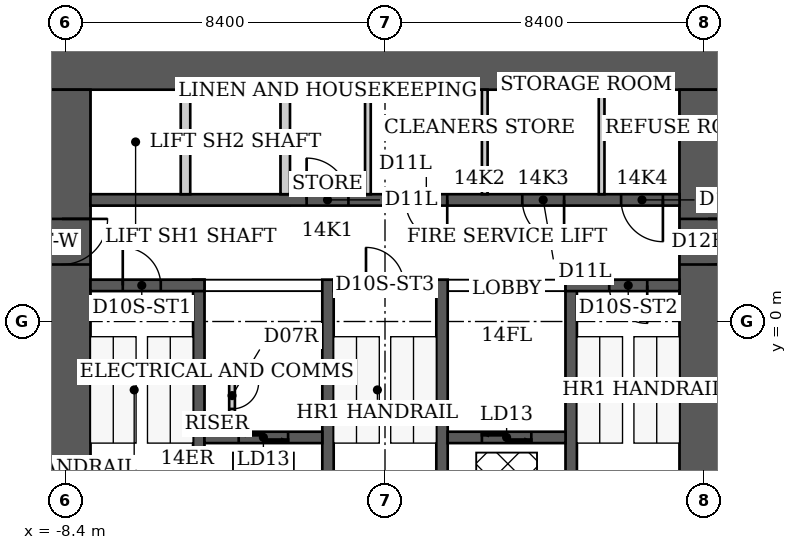
"""IFC4 building model, lengths in metres.
Left out: names, types, materials, properties, quantities, classifications, styles, units other than length and angle.
Written with IfcOpenShell. Run it as: python <this file> out.ifc"""

import sys

from ifc_helpers import new_model, si_unit, direction, frame, frame_2d, origin, place, context, subcontext, project, spatial, rectangle, extrude, element, fill, save


model = new_model("IFC4")
c1 = context("Model", 3, precision=1e-05, world=origin(), true_north=direction((0.0, 1.0)))
c2 = subcontext(c1, "Body", "Model", "MODEL_VIEW")
j1 = project(units=[si_unit("LENGTHUNIT", "METRE"), si_unit("PLANEANGLEUNIT", "RADIAN")], contexts=[c1])
p1 = place(None, origin())
s1 = spatial("IfcSite", under=j1, at=p1, CompositionType="ELEMENT")
p2 = place(p1, origin())
s2 = spatial("IfcBuilding", under=s1, at=p2, CompositionType="ELEMENT")
p3 = place(p2, frame((0.0, 0.0, 61.0)))
s3 = spatial("IfcBuildingStorey", under=s2, at=p3, CompositionType="ELEMENT", Elevation=61.0)
p4 = place(p3, frame((-9.25, 6.85, 0.0), z_axis=(0.0, 0.0, 1.0), x_axis=(1.0, 0.0, 0.0)))
e1 = element("IfcWall", 1, at=p4, inside=s3, PredefinedType="SHEAR", context=c2, shape_type="SweptSolid", body=[
    extrude(rectangle(XDim=18.5, YDim=1.5, at=frame_2d((9.25, 0.0))), origin(), (0.0, 0.0, 1.0), 3.8),
])
p5 = place(p3, frame((-8.5, -9.2, 0.0), z_axis=(0.0, 0.0, 1.0), x_axis=(0.0, 1.0, 0.0)))
e2 = element("IfcWall", 2, at=p5, inside=s3, PredefinedType="SHEAR", context=c2, shape_type="SweptSolid", body=[
    extrude(rectangle(XDim=15.3, YDim=1.5, at=frame_2d((7.65, 0.0))), origin(), (0.0, 0.0, 1.0), 3.8),
])
p6 = place(p5, frame((10.7, 0.0, 0.0)))
e3 = element("IfcOpeningElement", 3, at=p6, cuts=e2, PredefinedType="OPENING", context=c2, shape_type="SweptSolid", body=[
    extrude(rectangle(XDim=1.2, YDim=2.2, at=frame_2d((0.6, 1.1))), frame((0.0, 0.75, 0.0), z_axis=(0.0, -1.0, 0.0), x_axis=(1.0, 0.0, 0.0)), (0.0, 0.0, 1.0), 1.5),
])
p7 = place(p3, frame((8.5, -9.2, 0.0), z_axis=(0.0, 0.0, 1.0), x_axis=(0.0, 1.0, 0.0)))
e4 = element("IfcWall", 4, at=p7, inside=s3, PredefinedType="SHEAR", context=c2, shape_type="SweptSolid", body=[
    extrude(rectangle(XDim=15.3, YDim=1.5, at=frame_2d((7.65, 0.0))), origin(), (0.0, 0.0, 1.0), 3.8),
])
p8 = place(p7, frame((10.7, 0.0, 0.0)))
e5 = element("IfcOpeningElement", 5, at=p8, cuts=e4, PredefinedType="OPENING", context=c2, shape_type="SweptSolid", body=[
    extrude(rectangle(XDim=1.2, YDim=2.2, at=frame_2d((0.6, 1.1))), frame((0.0, 0.75, 0.0), z_axis=(0.0, -1.0, 0.0), x_axis=(1.0, 0.0, 0.0)), (0.0, 0.0, 1.0), 1.5),
])
for number, where, z_axis, x_axis in (
    (6, (-4.9, -6.1, 0.0), (0.0, 0.0, 1.0), (0.0, 1.0, 0.0)),
    (7, (-1.5, -6.1, 0.0), (0.0, 0.0, 1.0), (0.0, 1.0, 0.0)),
    (8, (1.5, -6.1, 0.0), (0.0, 0.0, 1.0), (0.0, 1.0, 0.0)),
    (9, (4.9, -6.1, 0.0), (0.0, 0.0, 1.0), (0.0, 1.0, 0.0)),
):
    element("IfcWall", number, at=place(p3, frame(where, z_axis=z_axis, x_axis=x_axis)), inside=s3, PredefinedType="SHEAR", context=c2, shape_type="SweptSolid", body=[
        extrude(rectangle(XDim=7.2, YDim=0.3, at=frame_2d((3.6, 0.0))), origin(), (0.0, 0.0, 1.0), 3.8),
    ])
p9 = place(p3, frame((-7.75, 0.95, 0.0), z_axis=(0.0, 0.0, 1.0), x_axis=(1.0, 0.0, 0.0)))
e10 = element("IfcWall", 10, at=p9, inside=s3, PredefinedType="SHEAR", context=c2, shape_type="SweptSolid", body=[
    extrude(rectangle(XDim=3.0, YDim=0.3, at=frame_2d((1.5, 0.0))), origin(), (0.0, 0.0, 1.0), 3.8),
])
p10 = place(p9, frame((0.85, 0.0, 0.0)))
e11 = element("IfcOpeningElement", 11, at=p10, cuts=e10, PredefinedType="OPENING", context=c2, shape_type="SweptSolid", body=[
    extrude(rectangle(XDim=1.0, YDim=2.2, at=frame_2d((0.5, 1.1))), frame((0.0, 0.15, 0.0), z_axis=(0.0, -1.0, 0.0), x_axis=(1.0, 0.0, 0.0)), (0.0, 0.0, 1.0), 0.3),
])
p11 = place(p3, frame((-1.35, 0.95, 0.0), z_axis=(0.0, 0.0, 1.0), x_axis=(1.0, 0.0, 0.0)))
e12 = element("IfcWall", 12, at=p11, inside=s3, PredefinedType="SHEAR", context=c2, shape_type="SweptSolid", body=[
    extrude(rectangle(XDim=2.7, YDim=0.3, at=frame_2d((1.35, 0.0))), origin(), (0.0, 0.0, 1.0), 3.8),
])
p12 = place(p11, frame((0.85, 0.0, 0.0)))
e13 = element("IfcOpeningElement", 13, at=p12, cuts=e12, PredefinedType="OPENING", context=c2, shape_type="SweptSolid", body=[
    extrude(rectangle(XDim=1.0, YDim=2.2, at=frame_2d((0.5, 1.1))), frame((0.0, 0.15, 0.0), z_axis=(0.0, -1.0, 0.0), x_axis=(1.0, 0.0, 0.0)), (0.0, 0.0, 1.0), 0.3),
])
p13 = place(p3, frame((4.75, 0.95, 0.0), z_axis=(0.0, 0.0, 1.0), x_axis=(1.0, 0.0, 0.0)))
e14 = element("IfcWall", 14, at=p13, inside=s3, PredefinedType="SHEAR", context=c2, shape_type="SweptSolid", body=[
    extrude(rectangle(XDim=3.0, YDim=0.3, at=frame_2d((1.5, 0.0))), origin(), (0.0, 0.0, 1.0), 3.8),
])
p14 = place(p13, frame((1.15, 0.0, 0.0)))
e15 = element("IfcOpeningElement", 15, at=p14, cuts=e14, PredefinedType="OPENING", context=c2, shape_type="SweptSolid", body=[
    extrude(rectangle(XDim=1.0, YDim=2.2, at=frame_2d((0.5, 1.1))), frame((0.0, 0.15, 0.0), z_axis=(0.0, -1.0, 0.0), x_axis=(1.0, 0.0, 0.0)), (0.0, 0.0, 1.0), 0.3),
])
p15 = place(p3, frame((-4.75, -3.05, 0.0), z_axis=(0.0, 0.0, 1.0), x_axis=(1.0, 0.0, 0.0)))
e16 = element("IfcWall", 16, at=p15, inside=s3, PredefinedType="SHEAR", context=c2, shape_type="SweptSolid", body=[
    extrude(rectangle(XDim=3.1, YDim=0.3, at=frame_2d((1.55, 0.0))), origin(), (0.0, 0.0, 1.0), 3.8),
])
p16 = place(p15, frame((0.9, 0.0, 0.0)))
e17 = element("IfcOpeningElement", 17, at=p16, cuts=e16, PredefinedType="OPENING", context=c2, shape_type="SweptSolid", body=[
    extrude(rectangle(XDim=1.3, YDim=2.1, at=frame_2d((0.65, 1.05))), frame((0.0, 0.15, 0.0), z_axis=(0.0, -1.0, 0.0), x_axis=(1.0, 0.0, 0.0)), (0.0, 0.0, 1.0), 0.3),
])
p17 = place(p3, frame((1.65, -3.05, 0.0), z_axis=(0.0, 0.0, 1.0), x_axis=(1.0, 0.0, 0.0)))
e18 = element("IfcWall", 18, at=p17, inside=s3, PredefinedType="SHEAR", context=c2, shape_type="SweptSolid", body=[
    extrude(rectangle(XDim=3.1, YDim=0.3, at=frame_2d((1.55, 0.0))), origin(), (0.0, 0.0, 1.0), 3.8),
])
p18 = place(p17, frame((0.9, 0.0, 0.0)))
e19 = element("IfcOpeningElement", 19, at=p18, cuts=e18, PredefinedType="OPENING", context=c2, shape_type="SweptSolid", body=[
    extrude(rectangle(XDim=1.3, YDim=2.1, at=frame_2d((0.65, 1.05))), frame((0.0, 0.15, 0.0), z_axis=(0.0, -1.0, 0.0), x_axis=(1.0, 0.0, 0.0)), (0.0, 0.0, 1.0), 0.3),
])
p19 = place(p3, frame((-7.75, 3.2, 0.0), z_axis=(0.0, 0.0, 1.0), x_axis=(1.0, 0.0, 0.0)))
e20 = element("IfcWall", 20, at=p19, inside=s3, PredefinedType="SHEAR", context=c2, shape_type="SweptSolid", body=[
    extrude(rectangle(XDim=15.5, YDim=0.3, at=frame_2d((7.75, 0.0))), origin(), (0.0, 0.0, 1.0), 3.8),
])
p20 = place(p19, frame((5.688, 0.0, 0.0)))
e21 = element("IfcOpeningElement", 21, at=p20, cuts=e20, PredefinedType="OPENING", context=c2, shape_type="SweptSolid", body=[
    extrude(rectangle(XDim=1.1, YDim=2.2, at=frame_2d((0.55, 1.1))), frame((0.0, 0.15, 0.0), z_axis=(0.0, -1.0, 0.0), x_axis=(1.0, 0.0, 0.0)), (0.0, 0.0, 1.0), 0.3),
])
p21 = place(p19, frame((8.288, 0.0, 0.0)))
e22 = element("IfcOpeningElement", 22, at=p21, cuts=e20, PredefinedType="OPENING", context=c2, shape_type="SweptSolid", body=[
    extrude(rectangle(XDim=1.1, YDim=2.2, at=frame_2d((0.55, 1.1))), frame((0.0, 0.15, 0.0), z_axis=(0.0, -1.0, 0.0), x_axis=(1.0, 0.0, 0.0)), (0.0, 0.0, 1.0), 0.3),
])
p22 = place(p19, frame((11.363, 0.0, 0.0)))
e23 = element("IfcOpeningElement", 23, at=p22, cuts=e20, PredefinedType="OPENING", context=c2, shape_type="SweptSolid", body=[
    extrude(rectangle(XDim=1.1, YDim=2.2, at=frame_2d((0.55, 1.1))), frame((0.0, 0.15, 0.0), z_axis=(0.0, -1.0, 0.0), x_axis=(1.0, 0.0, 0.0)), (0.0, 0.0, 1.0), 0.3),
])
p23 = place(p19, frame((13.962, 0.0, 0.0)))
e24 = element("IfcOpeningElement", 24, at=p23, cuts=e20, PredefinedType="OPENING", context=c2, shape_type="SweptSolid", body=[
    extrude(rectangle(XDim=1.1, YDim=2.2, at=frame_2d((0.55, 1.1))), frame((0.0, 0.15, 0.0), z_axis=(0.0, -1.0, 0.0), x_axis=(1.0, 0.0, 0.0)), (0.0, 0.0, 1.0), 0.3),
])
for number, where, z_axis, x_axis in (
    (25, (-5.25, 3.35, 0.0), (0.0, 0.0, 1.0), (0.0, 1.0, 0.0)),
    (26, (-2.625, 3.35, 0.0), (0.0, 0.0, 1.0), (0.0, 1.0, 0.0)),
):
    element("IfcWall", number, at=place(p3, frame(where, z_axis=z_axis, x_axis=x_axis)), inside=s3, PredefinedType="PARTITIONING", context=c2, shape_type="SweptSolid", body=[
        extrude(rectangle(XDim=2.75, YDim=0.25, at=frame_2d((1.375, 0.0))), origin(), (0.0, 0.0, 1.0), 3.8),
    ])
p24 = place(p3, frame((-4.025, -2.9, 0.0), z_axis=(0.0, 0.0, 1.0), x_axis=(0.0, 1.0, 0.0)))
e27 = element("IfcWall", 27, at=p24, inside=s3, PredefinedType="PARTITIONING", context=c2, shape_type="SweptSolid", body=[
    extrude(rectangle(XDim=1.775, YDim=0.15, at=frame_2d((0.887, 0.0))), origin(), (0.0, 0.0, 1.0), 3.64),
])
p25 = place(p24, frame((0.6, 0.0, 0.0)))
e28 = element("IfcOpeningElement", 28, at=p25, cuts=e27, PredefinedType="OPENING", context=c2, shape_type="SweptSolid", body=[
    extrude(rectangle(XDim=0.7, YDim=2.1, at=frame_2d((0.35, 1.05))), frame((0.0, 0.075, 0.0), z_axis=(0.0, -1.0, 0.0), x_axis=(1.0, 0.0, 0.0)), (0.0, 0.0, 1.0), 0.15),
])
p26 = place(p3, frame((-4.75, -1.2, 0.0), z_axis=(0.0, 0.0, 1.0), x_axis=(1.0, 0.0, 0.0)))
e29 = element("IfcWall", 29, at=p26, inside=s3, PredefinedType="PARTITIONING", context=c2, shape_type="SweptSolid", body=[
    extrude(rectangle(XDim=0.8, YDim=0.15, at=frame_2d((0.4, 0.0))), origin(), (0.0, 0.0, 1.0), 3.64),
])
for number, where, z_axis, x_axis in (
    (30, (-0.45, 3.35, 0.0), (0.0, 0.0, 1.0), (0.0, 1.0, 0.0)),
    (31, (2.625, 3.35, 0.0), (0.0, 0.0, 1.0), (0.0, 1.0, 0.0)),
    (32, (5.7, 3.35, 0.0), (0.0, 0.0, 1.0), (0.0, 1.0, 0.0)),
):
    element("IfcWall", number, at=place(p3, frame(where, z_axis=z_axis, x_axis=x_axis)), inside=s3, PredefinedType="PARTITIONING", context=c2, shape_type="SweptSolid", body=[
        extrude(rectangle(XDim=2.75, YDim=0.15, at=frame_2d((1.375, 0.0))), origin(), (0.0, 0.0, 1.0), 3.64),
    ])
p27 = place(p10, origin())
e33 = element("IfcDoor", 33, at=p27, inside=s3, OperationType="SINGLE_SWING_LEFT", PredefinedType="DOOR", context=c2, shape_type="SweptSolid", body=[
    extrude(rectangle(XDim=1.0, YDim=2.2, at=frame_2d((0.5, 1.1))), frame((0.0, 0.025, 0.0), z_axis=(0.0, -1.0, 0.0), x_axis=(1.0, 0.0, 0.0)), (0.0, 0.0, 1.0), 0.05),
])
fill(e11, e33)
p28 = place(p12, origin())
e34 = element("IfcDoor", 34, at=p28, inside=s3, OperationType="SINGLE_SWING_LEFT", PredefinedType="DOOR", context=c2, shape_type="SweptSolid", body=[
    extrude(rectangle(XDim=1.0, YDim=2.2, at=frame_2d((0.5, 1.1))), frame((0.0, 0.025, 0.0), z_axis=(0.0, -1.0, 0.0), x_axis=(1.0, 0.0, 0.0)), (0.0, 0.0, 1.0), 0.05),
])
fill(e13, e34)
p29 = place(p14, origin())
e35 = element("IfcDoor", 35, at=p29, inside=s3, OperationType="SINGLE_SWING_RIGHT", PredefinedType="DOOR", context=c2, shape_type="SweptSolid", body=[
    extrude(rectangle(XDim=1.0, YDim=2.2, at=frame_2d((0.5, 1.1))), frame((0.0, 0.025, 0.0), z_axis=(0.0, -1.0, 0.0), x_axis=(1.0, 0.0, 0.0)), (0.0, 0.0, 1.0), 0.05),
])
fill(e15, e35)
p30 = place(p6, origin())
e36 = element("IfcDoor", 36, at=p30, inside=s3, OperationType="SINGLE_SWING_RIGHT", PredefinedType="DOOR", context=c2, shape_type="SweptSolid", body=[
    extrude(rectangle(XDim=1.2, YDim=2.2, at=frame_2d((0.6, 1.1))), frame((0.0, 0.025, 0.0), z_axis=(0.0, -1.0, 0.0), x_axis=(1.0, 0.0, 0.0)), (0.0, 0.0, 1.0), 0.05),
])
fill(e3, e36)
p31 = place(p8, origin())
e37 = element("IfcDoor", 37, at=p31, inside=s3, OperationType="SINGLE_SWING_RIGHT", PredefinedType="DOOR", context=c2, shape_type="SweptSolid", body=[
    extrude(rectangle(XDim=1.2, YDim=2.2, at=frame_2d((0.6, 1.1))), frame((0.0, 0.025, 0.0), z_axis=(0.0, -1.0, 0.0), x_axis=(1.0, 0.0, 0.0)), (0.0, 0.0, 1.0), 0.05),
])
fill(e5, e37)
p32 = place(p25, origin())
e38 = element("IfcDoor", 38, at=p32, inside=s3, OperationType="SINGLE_SWING_RIGHT", PredefinedType="DOOR", context=c2, shape_type="SweptSolid", body=[
    extrude(rectangle(XDim=0.7, YDim=2.1, at=frame_2d((0.35, 1.05))), frame((0.0, 0.025, 0.0), z_axis=(0.0, -1.0, 0.0), x_axis=(1.0, 0.0, 0.0)), (0.0, 0.0, 1.0), 0.05),
])
fill(e28, e38)
p33 = place(p20, origin())
e39 = element("IfcDoor", 39, at=p33, inside=s3, OperationType="SINGLE_SWING_LEFT", PredefinedType="DOOR", context=c2, shape_type="SweptSolid", body=[
    extrude(rectangle(XDim=1.1, YDim=2.2, at=frame_2d((0.55, 1.1))), frame((0.0, 0.025, 0.0), z_axis=(0.0, -1.0, 0.0), x_axis=(1.0, 0.0, 0.0)), (0.0, 0.0, 1.0), 0.05),
])
fill(e21, e39)
p34 = place(p21, origin())
e40 = element("IfcDoor", 40, at=p34, inside=s3, OperationType="SINGLE_SWING_RIGHT", PredefinedType="DOOR", context=c2, shape_type="SweptSolid", body=[
    extrude(rectangle(XDim=1.1, YDim=2.2, at=frame_2d((0.55, 1.1))), frame((0.0, 0.025, 0.0), z_axis=(0.0, -1.0, 0.0), x_axis=(1.0, 0.0, 0.0)), (0.0, 0.0, 1.0), 0.05),
])
fill(e22, e40)
p35 = place(p22, origin())
e41 = element("IfcDoor", 41, at=p35, inside=s3, OperationType="SINGLE_SWING_RIGHT", PredefinedType="DOOR", context=c2, shape_type="SweptSolid", body=[
    extrude(rectangle(XDim=1.1, YDim=2.2, at=frame_2d((0.55, 1.1))), frame((0.0, 0.025, 0.0), z_axis=(0.0, -1.0, 0.0), x_axis=(1.0, 0.0, 0.0)), (0.0, 0.0, 1.0), 0.05),
])
fill(e23, e41)
p36 = place(p23, origin())
e42 = element("IfcDoor", 42, at=p36, inside=s3, OperationType="SINGLE_SWING_RIGHT", PredefinedType="DOOR", context=c2, shape_type="SweptSolid", body=[
    extrude(rectangle(XDim=1.1, YDim=2.2, at=frame_2d((0.55, 1.1))), frame((0.0, 0.025, 0.0), z_axis=(0.0, -1.0, 0.0), x_axis=(1.0, 0.0, 0.0)), (0.0, 0.0, 1.0), 0.05),
])
fill(e24, e42)
p37 = place(p16, origin())
e43 = element("IfcDoor", 43, at=p37, inside=s3, OperationType="DOUBLE_DOOR_SLIDING", PredefinedType="DOOR", context=c2, shape_type="SweptSolid", body=[
    extrude(rectangle(XDim=1.3, YDim=2.1, at=frame_2d((0.65, 1.05))), frame((0.0, 0.025, 0.0), z_axis=(0.0, -1.0, 0.0), x_axis=(1.0, 0.0, 0.0)), (0.0, 0.0, 1.0), 0.05),
])
fill(e17, e43)
p38 = place(p18, origin())
e44 = element("IfcDoor", 44, at=p38, inside=s3, OperationType="DOUBLE_DOOR_SLIDING", PredefinedType="DOOR", context=c2, shape_type="SweptSolid", body=[
    extrude(rectangle(XDim=1.3, YDim=2.1, at=frame_2d((0.65, 1.05))), frame((0.0, 0.025, 0.0), z_axis=(0.0, -1.0, 0.0), x_axis=(1.0, 0.0, 0.0)), (0.0, 0.0, 1.0), 0.05),
])
fill(e19, e44)
save(model, sys.argv[1])
